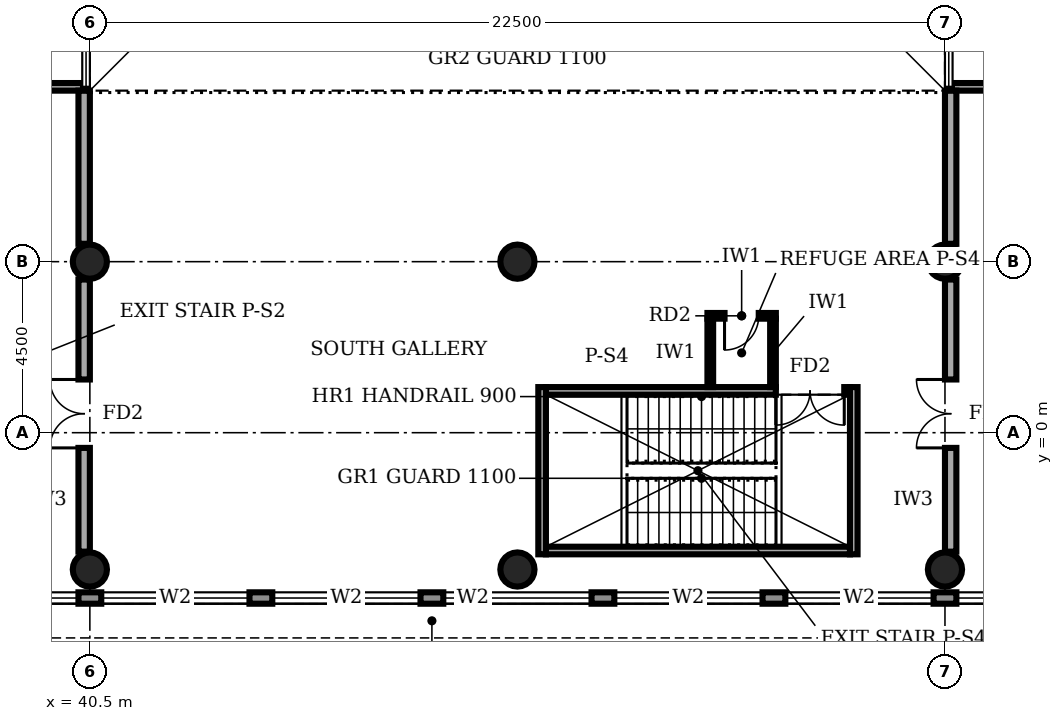
"""IFC4 building model, lengths in metres.
Left out: names, types, materials, properties, quantities, classifications, styles, units other than length and angle.
Written with IfcOpenShell. Run it as: python <this file> out.ifc"""

import sys

from ifc_helpers import new_model, si_unit, direction, frame, frame_2d, origin, origin_2d, place, context, subcontext, project, spatial, rectangle, circle, extrude, element, fill, save


model = new_model("IFC4")
c1 = context("Model", 3, precision=1e-05, world=origin(), true_north=direction((0.0, 1.0)))
c2 = subcontext(c1, "Body", "Model", "MODEL_VIEW")
j1 = project(units=[si_unit("LENGTHUNIT", "METRE"), si_unit("PLANEANGLEUNIT", "RADIAN")], contexts=[c1])
p1 = place(None, origin())
s1 = spatial("IfcSite", under=j1, at=p1, CompositionType="ELEMENT")
p2 = place(p1, origin())
s2 = spatial("IfcBuilding", under=s1, at=p2, CompositionType="ELEMENT")
p3 = place(p2, frame((0.0, 0.0, 6.0)))
s3 = spatial("IfcBuildingStorey", under=s2, at=p3, CompositionType="ELEMENT", Elevation=6.0)
for number, where, z_axis, x_axis in (
    (1, (40.5, -3.6, 0.0), (0.0, 0.0, 1.0), (1.0, 0.0, 0.0)),
    (2, (51.75, -3.6, 0.0), (0.0, 0.0, 1.0), (1.0, 0.0, 0.0)),
    (3, (63.0, -3.6, 0.0), (0.0, 0.0, 1.0), (1.0, 0.0, 0.0)),
    (4, (40.5, 4.5, 0.0), (0.0, 0.0, 1.0), (1.0, 0.0, 0.0)),
    (5, (51.75, 4.5, 0.0), (0.0, 0.0, 1.0), (1.0, 0.0, 0.0)),
    (6, (63.0, 4.5, 0.0), (0.0, 0.0, 1.0), (1.0, 0.0, 0.0)),
):
    element("IfcColumn", number, at=place(p3, frame(where, z_axis=z_axis, x_axis=x_axis)), inside=s3, PredefinedType="COLUMN", context=c2, shape_type="SweptSolid", body=[
        extrude(circle(Radius=0.45, at=origin_2d()), origin(), (0.0, 0.0, 1.0), 5.0),
    ])
p4 = place(p3, frame((0.02, -4.35, 0.0), z_axis=(0.0, 0.0, 1.0), x_axis=(1.0, 0.0, 0.0)))
e7 = element("IfcWall", 7, at=p4, inside=s3, PredefinedType="STANDARD", context=c2, shape_type="SweptSolid", body=[
    extrude(rectangle(XDim=98.96, YDim=0.3, at=frame_2d((49.48, 0.0))), origin(), (0.0, 0.0, 1.0), 4.7),
])
p5 = place(p4, frame((4.78, 0.0, 0.6)))
e8 = element("IfcOpeningElement", 8, at=p5, cuts=e7, PredefinedType="OPENING", context=c2, shape_type="SweptSolid", body=[
    extrude(rectangle(XDim=3.9, YDim=2.6, at=frame_2d((1.95, 1.3))), frame((0.0, 0.16, 0.0), z_axis=(0.0, -1.0, 0.0), x_axis=(1.0, 0.0, 0.0)), (0.0, 0.0, 1.0), 0.32),
])
p6 = place(p4, frame((9.28, 0.0, 0.6)))
e9 = element("IfcOpeningElement", 9, at=p6, cuts=e7, PredefinedType="OPENING", context=c2, shape_type="SweptSolid", body=[
    extrude(rectangle(XDim=3.9, YDim=2.6, at=frame_2d((1.95, 1.3))), frame((0.0, 0.16, 0.0), z_axis=(0.0, -1.0, 0.0), x_axis=(1.0, 0.0, 0.0)), (0.0, 0.0, 1.0), 0.32),
])
p7 = place(p4, frame((13.78, 0.0, 0.6)))
e10 = element("IfcOpeningElement", 10, at=p7, cuts=e7, PredefinedType="OPENING", context=c2, shape_type="SweptSolid", body=[
    extrude(rectangle(XDim=3.9, YDim=2.6, at=frame_2d((1.95, 1.3))), frame((0.0, 0.16, 0.0), z_axis=(0.0, -1.0, 0.0), x_axis=(1.0, 0.0, 0.0)), (0.0, 0.0, 1.0), 0.32),
])
p8 = place(p4, frame((18.28, 0.0, 0.6)))
e11 = element("IfcOpeningElement", 11, at=p8, cuts=e7, PredefinedType="OPENING", context=c2, shape_type="SweptSolid", body=[
    extrude(rectangle(XDim=3.9, YDim=2.6, at=frame_2d((1.95, 1.3))), frame((0.0, 0.16, 0.0), z_axis=(0.0, -1.0, 0.0), x_axis=(1.0, 0.0, 0.0)), (0.0, 0.0, 1.0), 0.32),
])
p9 = place(p4, frame((22.78, 0.0, 0.6)))
e12 = element("IfcOpeningElement", 12, at=p9, cuts=e7, PredefinedType="OPENING", context=c2, shape_type="SweptSolid", body=[
    extrude(rectangle(XDim=3.9, YDim=2.6, at=frame_2d((1.95, 1.3))), frame((0.0, 0.16, 0.0), z_axis=(0.0, -1.0, 0.0), x_axis=(1.0, 0.0, 0.0)), (0.0, 0.0, 1.0), 0.32),
])
p10 = place(p4, frame((27.28, 0.0, 0.6)))
e13 = element("IfcOpeningElement", 13, at=p10, cuts=e7, PredefinedType="OPENING", context=c2, shape_type="SweptSolid", body=[
    extrude(rectangle(XDim=3.9, YDim=2.6, at=frame_2d((1.95, 1.3))), frame((0.0, 0.16, 0.0), z_axis=(0.0, -1.0, 0.0), x_axis=(1.0, 0.0, 0.0)), (0.0, 0.0, 1.0), 0.32),
])
p11 = place(p4, frame((31.78, 0.0, 0.6)))
e14 = element("IfcOpeningElement", 14, at=p11, cuts=e7, PredefinedType="OPENING", context=c2, shape_type="SweptSolid", body=[
    extrude(rectangle(XDim=3.9, YDim=2.6, at=frame_2d((1.95, 1.3))), frame((0.0, 0.16, 0.0), z_axis=(0.0, -1.0, 0.0), x_axis=(1.0, 0.0, 0.0)), (0.0, 0.0, 1.0), 0.32),
])
p12 = place(p4, frame((36.28, 0.0, 0.6)))
e15 = element("IfcOpeningElement", 15, at=p12, cuts=e7, PredefinedType="OPENING", context=c2, shape_type="SweptSolid", body=[
    extrude(rectangle(XDim=3.9, YDim=2.6, at=frame_2d((1.95, 1.3))), frame((0.0, 0.16, 0.0), z_axis=(0.0, -1.0, 0.0), x_axis=(1.0, 0.0, 0.0)), (0.0, 0.0, 1.0), 0.32),
])
p13 = place(p4, frame((40.78, 0.0, 0.6)))
e16 = element("IfcOpeningElement", 16, at=p13, cuts=e7, PredefinedType="OPENING", context=c2, shape_type="SweptSolid", body=[
    extrude(rectangle(XDim=3.9, YDim=2.6, at=frame_2d((1.95, 1.3))), frame((0.0, 0.16, 0.0), z_axis=(0.0, -1.0, 0.0), x_axis=(1.0, 0.0, 0.0)), (0.0, 0.0, 1.0), 0.32),
])
p14 = place(p4, frame((45.28, 0.0, 0.6)))
e17 = element("IfcOpeningElement", 17, at=p14, cuts=e7, PredefinedType="OPENING", context=c2, shape_type="SweptSolid", body=[
    extrude(rectangle(XDim=3.9, YDim=2.6, at=frame_2d((1.95, 1.3))), frame((0.0, 0.16, 0.0), z_axis=(0.0, -1.0, 0.0), x_axis=(1.0, 0.0, 0.0)), (0.0, 0.0, 1.0), 0.32),
])
p15 = place(p4, frame((49.78, 0.0, 0.6)))
e18 = element("IfcOpeningElement", 18, at=p15, cuts=e7, PredefinedType="OPENING", context=c2, shape_type="SweptSolid", body=[
    extrude(rectangle(XDim=3.9, YDim=2.6, at=frame_2d((1.95, 1.3))), frame((0.0, 0.16, 0.0), z_axis=(0.0, -1.0, 0.0), x_axis=(1.0, 0.0, 0.0)), (0.0, 0.0, 1.0), 0.32),
])
p16 = place(p4, frame((54.28, 0.0, 0.6)))
e19 = element("IfcOpeningElement", 19, at=p16, cuts=e7, PredefinedType="OPENING", context=c2, shape_type="SweptSolid", body=[
    extrude(rectangle(XDim=3.9, YDim=2.6, at=frame_2d((1.95, 1.3))), frame((0.0, 0.16, 0.0), z_axis=(0.0, -1.0, 0.0), x_axis=(1.0, 0.0, 0.0)), (0.0, 0.0, 1.0), 0.32),
])
p17 = place(p4, frame((58.78, 0.0, 0.6)))
e20 = element("IfcOpeningElement", 20, at=p17, cuts=e7, PredefinedType="OPENING", context=c2, shape_type="SweptSolid", body=[
    extrude(rectangle(XDim=3.9, YDim=2.6, at=frame_2d((1.95, 1.3))), frame((0.0, 0.16, 0.0), z_axis=(0.0, -1.0, 0.0), x_axis=(1.0, 0.0, 0.0)), (0.0, 0.0, 1.0), 0.32),
])
p18 = place(p4, frame((63.28, 0.0, 0.6)))
e21 = element("IfcOpeningElement", 21, at=p18, cuts=e7, PredefinedType="OPENING", context=c2, shape_type="SweptSolid", body=[
    extrude(rectangle(XDim=3.9, YDim=2.6, at=frame_2d((1.95, 1.3))), frame((0.0, 0.16, 0.0), z_axis=(0.0, -1.0, 0.0), x_axis=(1.0, 0.0, 0.0)), (0.0, 0.0, 1.0), 0.32),
])
p19 = place(p4, frame((67.78, 0.0, 0.6)))
e22 = element("IfcOpeningElement", 22, at=p19, cuts=e7, PredefinedType="OPENING", context=c2, shape_type="SweptSolid", body=[
    extrude(rectangle(XDim=3.9, YDim=2.6, at=frame_2d((1.95, 1.3))), frame((0.0, 0.16, 0.0), z_axis=(0.0, -1.0, 0.0), x_axis=(1.0, 0.0, 0.0)), (0.0, 0.0, 1.0), 0.32),
])
p20 = place(p4, frame((72.28, 0.0, 0.6)))
e23 = element("IfcOpeningElement", 23, at=p20, cuts=e7, PredefinedType="OPENING", context=c2, shape_type="SweptSolid", body=[
    extrude(rectangle(XDim=3.9, YDim=2.6, at=frame_2d((1.95, 1.3))), frame((0.0, 0.16, 0.0), z_axis=(0.0, -1.0, 0.0), x_axis=(1.0, 0.0, 0.0)), (0.0, 0.0, 1.0), 0.32),
])
p21 = place(p4, frame((76.78, 0.0, 0.6)))
e24 = element("IfcOpeningElement", 24, at=p21, cuts=e7, PredefinedType="OPENING", context=c2, shape_type="SweptSolid", body=[
    extrude(rectangle(XDim=3.9, YDim=2.6, at=frame_2d((1.95, 1.3))), frame((0.0, 0.16, 0.0), z_axis=(0.0, -1.0, 0.0), x_axis=(1.0, 0.0, 0.0)), (0.0, 0.0, 1.0), 0.32),
])
p22 = place(p4, frame((81.28, 0.0, 0.6)))
e25 = element("IfcOpeningElement", 25, at=p22, cuts=e7, PredefinedType="OPENING", context=c2, shape_type="SweptSolid", body=[
    extrude(rectangle(XDim=3.9, YDim=2.6, at=frame_2d((1.95, 1.3))), frame((0.0, 0.16, 0.0), z_axis=(0.0, -1.0, 0.0), x_axis=(1.0, 0.0, 0.0)), (0.0, 0.0, 1.0), 0.32),
])
p23 = place(p4, frame((85.78, 0.0, 0.6)))
e26 = element("IfcOpeningElement", 26, at=p23, cuts=e7, PredefinedType="OPENING", context=c2, shape_type="SweptSolid", body=[
    extrude(rectangle(XDim=3.9, YDim=2.6, at=frame_2d((1.95, 1.3))), frame((0.0, 0.16, 0.0), z_axis=(0.0, -1.0, 0.0), x_axis=(1.0, 0.0, 0.0)), (0.0, 0.0, 1.0), 0.32),
])
p24 = place(p4, frame((90.28, 0.0, 0.6)))
e27 = element("IfcOpeningElement", 27, at=p24, cuts=e7, PredefinedType="OPENING", context=c2, shape_type="SweptSolid", body=[
    extrude(rectangle(XDim=3.9, YDim=2.6, at=frame_2d((1.95, 1.3))), frame((0.0, 0.16, 0.0), z_axis=(0.0, -1.0, 0.0), x_axis=(1.0, 0.0, 0.0)), (0.0, 0.0, 1.0), 0.32),
])
p25 = place(p4, frame((94.78, 0.0, 0.6)))
e28 = element("IfcOpeningElement", 28, at=p25, cuts=e7, PredefinedType="OPENING", context=c2, shape_type="SweptSolid", body=[
    extrude(rectangle(XDim=3.9, YDim=2.6, at=frame_2d((1.95, 1.3))), frame((0.0, 0.16, 0.0), z_axis=(0.0, -1.0, 0.0), x_axis=(1.0, 0.0, 0.0)), (0.0, 0.0, 1.0), 0.32),
])
p26 = place(p3, frame((28.8, 9.1, 0.0), z_axis=(0.0, 0.0, 1.0), x_axis=(1.0, 0.0, 0.0)))
e29 = element("IfcWall", 29, at=p26, inside=s3, PredefinedType="SOLIDWALL", context=c2, shape_type="SweptSolid", body=[
    extrude(rectangle(XDim=11.52, YDim=0.2, at=frame_2d((5.76, 0.0))), origin(), (0.0, 0.0, 1.0), 4.7),
])
p27 = place(p3, frame((63.18, 9.1, 0.0), z_axis=(0.0, 0.0, 1.0), x_axis=(1.0, 0.0, 0.0)))
e30 = element("IfcWall", 30, at=p27, inside=s3, PredefinedType="SOLIDWALL", context=c2, shape_type="SweptSolid", body=[
    extrude(rectangle(XDim=9.27, YDim=0.2, at=frame_2d((4.635, 0.0))), origin(), (0.0, 0.0, 1.0), 4.7),
])
p28 = place(p3, frame((52.5, 1.1, 0.0), z_axis=(0.0, 0.0, 1.0), x_axis=(1.0, 0.0, 0.0)))
e31 = element("IfcWall", 31, at=p28, inside=s3, PredefinedType="SOLIDWALL", context=c2, shape_type="SweptSolid", body=[
    extrude(rectangle(XDim=8.0, YDim=0.2, at=frame_2d((4.0, 0.0))), origin(), (0.0, 0.0, 1.0), 4.7),
])
p29 = place(p28, frame((6.05, 0.0, 0.0)))
e32 = element("IfcOpeningElement", 32, at=p29, cuts=e31, PredefinedType="OPENING", context=c2, shape_type="SweptSolid", body=[
    extrude(rectangle(XDim=1.8, YDim=2.1, at=frame_2d((0.9, 1.05))), frame((0.0, 0.11, 0.0), z_axis=(0.0, -1.0, 0.0), x_axis=(1.0, 0.0, 0.0)), (0.0, 0.0, 1.0), 0.22),
])
p30 = place(p3, frame((52.5, -3.1, 0.0), z_axis=(0.0, 0.0, 1.0), x_axis=(1.0, 0.0, 0.0)))
e33 = element("IfcWall", 33, at=p30, inside=s3, PredefinedType="SOLIDWALL", context=c2, shape_type="SweptSolid", body=[
    extrude(rectangle(XDim=8.0, YDim=0.2, at=frame_2d((4.0, 0.0))), origin(), (0.0, 0.0, 1.0), 4.7),
])
for number, where, z_axis, x_axis in (
    (34, (52.4, -3.2, 0.0), (0.0, 0.0, 1.0), (0.0, 1.0, 0.0)),
    (35, (60.6, -3.2, 0.0), (0.0, 0.0, 1.0), (0.0, 1.0, 0.0)),
):
    element("IfcWall", number, at=place(p3, frame(where, z_axis=z_axis, x_axis=x_axis)), inside=s3, PredefinedType="SOLIDWALL", context=c2, shape_type="SweptSolid", body=[
        extrude(rectangle(XDim=4.4, YDim=0.2, at=frame_2d((2.2, 0.0))), origin(), (0.0, 0.0, 1.0), 4.7),
    ])
p31 = place(p3, frame((40.35, -3.13, 0.0), z_axis=(0.0, 0.0, 1.0), x_axis=(0.0, 1.0, 0.0)))
e36 = element("IfcWall", 36, at=p31, inside=s3, PredefinedType="SOLIDWALL", context=c2, shape_type="SweptSolid", body=[
    extrude(rectangle(XDim=7.16, YDim=0.3, at=frame_2d((3.58, 0.0))), origin(), (0.0, 0.0, 1.0), 3.7),
])
p32 = place(p31, frame((2.73, 0.0, 0.0)))
e37 = element("IfcOpeningElement", 37, at=p32, cuts=e36, PredefinedType="OPENING", context=c2, shape_type="SweptSolid", body=[
    extrude(rectangle(XDim=1.8, YDim=2.1, at=frame_2d((0.9, 1.05))), frame((0.0, 0.16, 0.0), z_axis=(0.0, -1.0, 0.0), x_axis=(1.0, 0.0, 0.0)), (0.0, 0.0, 1.0), 0.32),
])
p33 = place(p3, frame((40.35, 4.97, 0.0), z_axis=(0.0, 0.0, 1.0), x_axis=(0.0, 1.0, 0.0)))
e38 = element("IfcWall", 38, at=p33, inside=s3, PredefinedType="SOLIDWALL", context=c2, shape_type="SweptSolid", body=[
    extrude(rectangle(XDim=4.03, YDim=0.3, at=frame_2d((2.015, 0.0))), origin(), (0.0, 0.0, 1.0), 4.7),
])
p34 = place(p3, frame((63.15, -3.13, 0.0), z_axis=(0.0, 0.0, 1.0), x_axis=(0.0, 1.0, 0.0)))
e39 = element("IfcWall", 39, at=p34, inside=s3, PredefinedType="SOLIDWALL", context=c2, shape_type="SweptSolid", body=[
    extrude(rectangle(XDim=7.16, YDim=0.3, at=frame_2d((3.58, 0.0))), origin(), (0.0, 0.0, 1.0), 3.7),
])
p35 = place(p34, frame((2.73, 0.0, 0.0)))
e40 = element("IfcOpeningElement", 40, at=p35, cuts=e39, PredefinedType="OPENING", context=c2, shape_type="SweptSolid", body=[
    extrude(rectangle(XDim=1.8, YDim=2.1, at=frame_2d((0.9, 1.05))), frame((0.0, 0.16, 0.0), z_axis=(0.0, -1.0, 0.0), x_axis=(1.0, 0.0, 0.0)), (0.0, 0.0, 1.0), 0.32),
])
p36 = place(p3, frame((63.15, 4.97, 0.0), z_axis=(0.0, 0.0, 1.0), x_axis=(0.0, 1.0, 0.0)))
e41 = element("IfcWall", 41, at=p36, inside=s3, PredefinedType="SOLIDWALL", context=c2, shape_type="SweptSolid", body=[
    extrude(rectangle(XDim=4.03, YDim=0.3, at=frame_2d((2.015, 0.0))), origin(), (0.0, 0.0, 1.0), 4.7),
])
p37 = place(p3, frame((58.475, 1.2, 0.0), z_axis=(0.0, 0.0, 1.0), x_axis=(0.0, 1.0, 0.0)))
e42 = element("IfcWall", 42, at=p37, inside=s3, PredefinedType="PARTITIONING", context=c2, shape_type="SweptSolid", body=[
    extrude(rectangle(XDim=1.8, YDim=0.15, at=frame_2d((0.9, 0.0))), origin(), (0.0, 0.0, 1.0), 4.7),
])
p38 = place(p3, frame((56.75, 3.075, 0.0), z_axis=(0.0, 0.0, 1.0), x_axis=(1.0, 0.0, 0.0)))
e43 = element("IfcWall", 43, at=p38, inside=s3, PredefinedType="PARTITIONING", context=c2, shape_type="SweptSolid", body=[
    extrude(rectangle(XDim=1.8, YDim=0.15, at=frame_2d((0.9, 0.0))), origin(), (0.0, 0.0, 1.0), 4.7),
])
p39 = place(p38, frame((0.45, 0.0, 0.0)))
e44 = element("IfcOpeningElement", 44, at=p39, cuts=e43, PredefinedType="OPENING", context=c2, shape_type="SweptSolid", body=[
    extrude(rectangle(XDim=0.9, YDim=2.1, at=frame_2d((0.45, 1.05))), frame((0.0, 0.085, 0.0), z_axis=(0.0, -1.0, 0.0), x_axis=(1.0, 0.0, 0.0)), (0.0, 0.0, 1.0), 0.17),
])
p40 = place(p3, frame((56.825, 1.2, 0.0), z_axis=(0.0, 0.0, 1.0), x_axis=(0.0, 1.0, 0.0)))
e45 = element("IfcWall", 45, at=p40, inside=s3, PredefinedType="PARTITIONING", context=c2, shape_type="SweptSolid", body=[
    extrude(rectangle(XDim=1.8, YDim=0.15, at=frame_2d((0.9, 0.0))), origin(), (0.0, 0.0, 1.0), 4.7),
])
p41 = place(p12, origin())
e46 = element("IfcWindow", 46, at=p41, inside=s3, PartitioningType="SINGLE_PANEL", PredefinedType="WINDOW", context=c2, shape_type="SweptSolid", body=[
    extrude(rectangle(XDim=3.9, YDim=2.6, at=frame_2d((1.95, 1.3))), frame((0.0, 0.03, 0.0), z_axis=(0.0, -1.0, 0.0), x_axis=(1.0, 0.0, 0.0)), (0.0, 0.0, 1.0), 0.06),
])
fill(e15, e46)
p42 = place(p13, origin())
e47 = element("IfcWindow", 47, at=p42, inside=s3, PartitioningType="SINGLE_PANEL", PredefinedType="WINDOW", context=c2, shape_type="SweptSolid", body=[
    extrude(rectangle(XDim=3.9, YDim=2.6, at=frame_2d((1.95, 1.3))), frame((0.0, 0.03, 0.0), z_axis=(0.0, -1.0, 0.0), x_axis=(1.0, 0.0, 0.0)), (0.0, 0.0, 1.0), 0.06),
])
fill(e16, e47)
p43 = place(p14, origin())
e48 = element("IfcWindow", 48, at=p43, inside=s3, PartitioningType="SINGLE_PANEL", PredefinedType="WINDOW", context=c2, shape_type="SweptSolid", body=[
    extrude(rectangle(XDim=3.9, YDim=2.6, at=frame_2d((1.95, 1.3))), frame((0.0, 0.03, 0.0), z_axis=(0.0, -1.0, 0.0), x_axis=(1.0, 0.0, 0.0)), (0.0, 0.0, 1.0), 0.06),
])
fill(e17, e48)
p44 = place(p15, origin())
e49 = element("IfcWindow", 49, at=p44, inside=s3, PartitioningType="SINGLE_PANEL", PredefinedType="WINDOW", context=c2, shape_type="SweptSolid", body=[
    extrude(rectangle(XDim=3.9, YDim=2.6, at=frame_2d((1.95, 1.3))), frame((0.0, 0.03, 0.0), z_axis=(0.0, -1.0, 0.0), x_axis=(1.0, 0.0, 0.0)), (0.0, 0.0, 1.0), 0.06),
])
fill(e18, e49)
p45 = place(p16, origin())
e50 = element("IfcWindow", 50, at=p45, inside=s3, PartitioningType="SINGLE_PANEL", PredefinedType="WINDOW", context=c2, shape_type="SweptSolid", body=[
    extrude(rectangle(XDim=3.9, YDim=2.6, at=frame_2d((1.95, 1.3))), frame((0.0, 0.03, 0.0), z_axis=(0.0, -1.0, 0.0), x_axis=(1.0, 0.0, 0.0)), (0.0, 0.0, 1.0), 0.06),
])
fill(e19, e50)
p46 = place(p17, origin())
e51 = element("IfcWindow", 51, at=p46, inside=s3, PartitioningType="SINGLE_PANEL", PredefinedType="WINDOW", context=c2, shape_type="SweptSolid", body=[
    extrude(rectangle(XDim=3.9, YDim=2.6, at=frame_2d((1.95, 1.3))), frame((0.0, 0.03, 0.0), z_axis=(0.0, -1.0, 0.0), x_axis=(1.0, 0.0, 0.0)), (0.0, 0.0, 1.0), 0.06),
])
fill(e20, e51)
p47 = place(p18, origin())
e52 = element("IfcWindow", 52, at=p47, inside=s3, PartitioningType="SINGLE_PANEL", PredefinedType="WINDOW", context=c2, shape_type="SweptSolid", body=[
    extrude(rectangle(XDim=3.9, YDim=2.6, at=frame_2d((1.95, 1.3))), frame((0.0, 0.03, 0.0), z_axis=(0.0, -1.0, 0.0), x_axis=(1.0, 0.0, 0.0)), (0.0, 0.0, 1.0), 0.06),
])
fill(e21, e52)
p48 = place(p29, frame((1.8, 0.0, 0.0), z_axis=(0.0, 0.0, 1.0), x_axis=(-1.0, 0.0, 0.0)))
e53 = element("IfcDoor", 53, at=p48, inside=s3, OperationType="DOUBLE_DOOR_SINGLE_SWING", PredefinedType="DOOR", context=c2, shape_type="SweptSolid", body=[
    extrude(rectangle(XDim=1.8, YDim=2.1, at=frame_2d((0.9, 1.05))), frame((0.0, 0.025, 0.0), z_axis=(0.0, -1.0, 0.0), x_axis=(1.0, 0.0, 0.0)), (0.0, 0.0, 1.0), 0.05),
])
fill(e32, e53)
p49 = place(p32, origin())
e54 = element("IfcDoor", 54, at=p49, inside=s3, OperationType="DOUBLE_DOOR_SINGLE_SWING", PredefinedType="DOOR", context=c2, shape_type="SweptSolid", body=[
    extrude(rectangle(XDim=1.8, YDim=2.1, at=frame_2d((0.9, 1.05))), frame((0.0, 0.025, 0.0), z_axis=(0.0, -1.0, 0.0), x_axis=(1.0, 0.0, 0.0)), (0.0, 0.0, 1.0), 0.05),
])
fill(e37, e54)
p50 = place(p35, origin())
e55 = element("IfcDoor", 55, at=p50, inside=s3, OperationType="DOUBLE_DOOR_SINGLE_SWING", PredefinedType="DOOR", context=c2, shape_type="SweptSolid", body=[
    extrude(rectangle(XDim=1.8, YDim=2.1, at=frame_2d((0.9, 1.05))), frame((0.0, 0.025, 0.0), z_axis=(0.0, -1.0, 0.0), x_axis=(1.0, 0.0, 0.0)), (0.0, 0.0, 1.0), 0.05),
])
fill(e40, e55)
p51 = place(p39, frame((0.9, 0.0, 0.0), z_axis=(0.0, 0.0, 1.0), x_axis=(-1.0, 0.0, 0.0)))
e56 = element("IfcDoor", 56, at=p51, inside=s3, OperationType="SINGLE_SWING_RIGHT", PredefinedType="DOOR", context=c2, shape_type="SweptSolid", body=[
    extrude(rectangle(XDim=0.9, YDim=2.1, at=frame_2d((0.45, 1.05))), frame((0.0, 0.025, 0.0), z_axis=(0.0, -1.0, 0.0), x_axis=(1.0, 0.0, 0.0)), (0.0, 0.0, 1.0), 0.05),
])
fill(e44, e56)
save(model, sys.argv[1])
